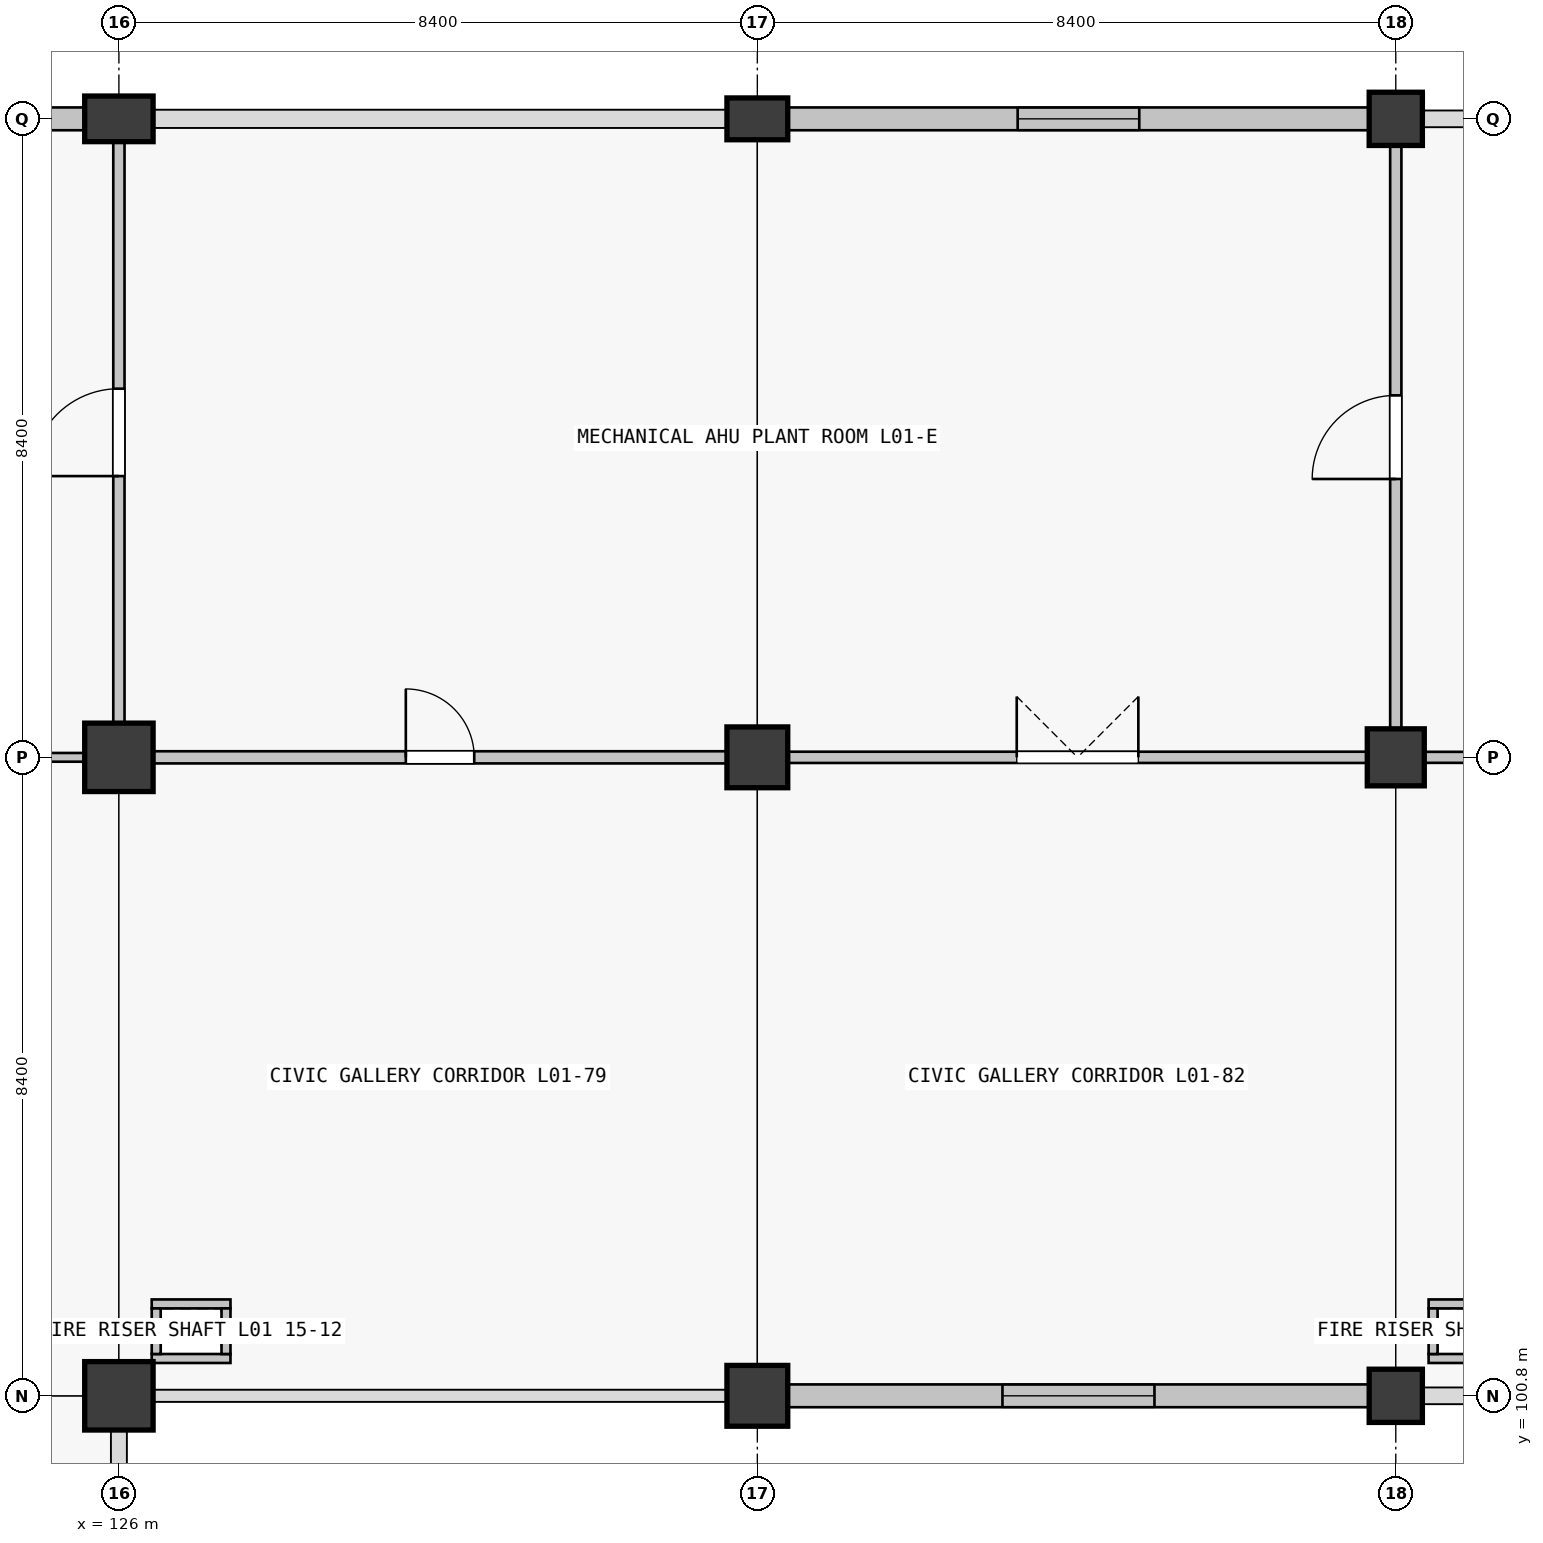
"""IFC4 building model, lengths in metres.
Left out: names, types, materials, properties, quantities, classifications, styles, units other than length and angle.
Written with IfcOpenShell. Run it as: python <this file> out.ifc"""

import sys

from ifc_helpers import new_model, si_unit, direction, frame, frame_2d, origin, origin_2d, place, context, subcontext, project, spatial, rectangle, extrude, element, fill, save


model = new_model("IFC4")
c1 = context("Model", 3, precision=1e-05, world=origin(), true_north=direction((0.0, 1.0)))
c2 = subcontext(c1, "Body", "Model", "MODEL_VIEW")
j1 = project(units=[si_unit("LENGTHUNIT", "METRE"), si_unit("PLANEANGLEUNIT", "RADIAN")], contexts=[c1])
p1 = place(None, origin())
s1 = spatial("IfcSite", under=j1, at=p1, CompositionType="ELEMENT")
p2 = place(p1, origin())
s2 = spatial("IfcBuilding", under=s1, at=p2, CompositionType="ELEMENT")
p3 = place(p2, frame((0.0, 0.0, 5.76)))
s3 = spatial("IfcBuildingStorey", under=s2, at=p3, CompositionType="ELEMENT", Elevation=5.76)
for number, where, z_axis, x_axis in (
    (1, (126.0, 100.8, 0.0), (0.0, 0.0, 1.0), (1.0, 0.0, 0.0)),
    (2, (126.0, 109.2, 0.0), (0.0, 0.0, 1.0), (1.0, 0.0, 0.0)),
):
    element("IfcColumn", number, at=place(p3, frame(where, z_axis=z_axis, x_axis=x_axis)), inside=s3, PredefinedType="COLUMN", context=c2, shape_type="SweptSolid", body=[
        extrude(rectangle(XDim=0.9, YDim=0.9, at=origin_2d()), origin(), (0.0, 0.0, 1.0), 4.5),
    ])
p4 = place(p3, frame((126.0, 117.6, 0.0), z_axis=(0.0, 0.0, 1.0), x_axis=(1.0, 0.0, 0.0)))
e3 = element("IfcColumn", 3, at=p4, inside=s3, PredefinedType="COLUMN", context=c2, shape_type="SweptSolid", body=[
    extrude(rectangle(XDim=0.9, YDim=0.6, at=origin_2d()), origin(), (0.0, 0.0, 1.0), 4.5),
])
for number, where, z_axis, x_axis in (
    (4, (134.4, 100.8, 0.0), (0.0, 0.0, 1.0), (1.0, 0.0, 0.0)),
    (5, (134.4, 109.2, 0.0), (0.0, 0.0, 1.0), (1.0, 0.0, 0.0)),
):
    element("IfcColumn", number, at=place(p3, frame(where, z_axis=z_axis, x_axis=x_axis)), inside=s3, PredefinedType="COLUMN", context=c2, shape_type="SweptSolid", body=[
        extrude(rectangle(XDim=0.8, YDim=0.8, at=origin_2d()), origin(), (0.0, 0.0, 1.0), 4.5),
    ])
p5 = place(p3, frame((134.4, 117.6, 0.0), z_axis=(0.0, 0.0, 1.0), x_axis=(1.0, 0.0, 0.0)))
e6 = element("IfcColumn", 6, at=p5, inside=s3, PredefinedType="COLUMN", context=c2, shape_type="SweptSolid", body=[
    extrude(rectangle(XDim=0.8, YDim=0.55, at=origin_2d()), origin(), (0.0, 0.0, 1.0), 4.5),
])
p6 = place(p3, frame((142.8, 100.8, 0.0), z_axis=(0.0, 0.0, 1.0), x_axis=(1.0, 0.0, 0.0)))
e7 = element("IfcColumn", 7, at=p6, inside=s3, PredefinedType="COLUMN", context=c2, shape_type="SweptSolid", body=[
    extrude(rectangle(XDim=0.7, YDim=0.7, at=origin_2d()), origin(), (0.0, 0.0, 1.0), 4.5),
])
p7 = place(p3, frame((142.8, 109.2, 0.0), z_axis=(0.0, 0.0, 1.0), x_axis=(1.0, 0.0, 0.0)))
e8 = element("IfcColumn", 8, at=p7, inside=s3, PredefinedType="COLUMN", context=c2, shape_type="SweptSolid", body=[
    extrude(rectangle(XDim=0.75, YDim=0.75, at=origin_2d()), origin(), (0.0, 0.0, 1.0), 4.5),
])
p8 = place(p3, frame((142.8, 117.6, 0.0), z_axis=(0.0, 0.0, 1.0), x_axis=(1.0, 0.0, 0.0)))
e9 = element("IfcColumn", 9, at=p8, inside=s3, PredefinedType="COLUMN", context=c2, shape_type="SweptSolid", body=[
    extrude(rectangle(XDim=0.7, YDim=0.7, at=origin_2d()), origin(), (0.0, 0.0, 1.0), 4.5),
])
p9 = place(p3, frame((118.051, 117.6, 0.0), z_axis=(0.0, 0.0, 1.0), x_axis=(1.0, 0.0, 0.0)))
e10 = element("IfcWall", 10, at=p9, inside=s3, PredefinedType="SOLIDWALL", context=c2, shape_type="SweptSolid", body=[
    extrude(rectangle(XDim=7.498, YDim=0.3, at=frame_2d((3.749, 0.0))), origin(), (0.0, 0.0, 1.0), 3.4),
])
p10 = place(p9, frame((2.499, 0.0, 0.9)))
e11 = element("IfcOpeningElement", 11, at=p10, cuts=e10, PredefinedType="OPENING", context=c2, shape_type="SweptSolid", body=[
    extrude(rectangle(XDim=2.5, YDim=1.65, at=frame_2d((1.25, 0.825))), frame((0.0, 0.15, 0.0), z_axis=(0.0, -1.0, 0.0), x_axis=(1.0, 0.0, 0.0)), (0.0, 0.0, 1.0), 0.3),
])
p11 = place(p3, frame((142.449, 100.8, 0.0), z_axis=(0.0, 0.0, 1.0), x_axis=(-1.0, 0.0, 0.0)))
e12 = element("IfcWall", 12, at=p11, inside=s3, PredefinedType="SOLIDWALL", context=c2, shape_type="SweptSolid", body=[
    extrude(rectangle(XDim=7.648, YDim=0.3, at=frame_2d((3.824, 0.0))), origin(), (0.0, 0.0, 1.0), 3.4),
])
p12 = place(p11, frame((2.824, 0.0, 0.9)))
e13 = element("IfcOpeningElement", 13, at=p12, cuts=e12, PredefinedType="OPENING", context=c2, shape_type="SweptSolid", body=[
    extrude(rectangle(XDim=2.0, YDim=2.25, at=frame_2d((1.0, 1.125))), frame((0.0, 0.15, 0.0), z_axis=(0.0, -1.0, 0.0), x_axis=(1.0, 0.0, 0.0)), (0.0, 0.0, 1.0), 0.3),
])
p13 = place(p3, frame((134.801, 117.6, 0.0), z_axis=(0.0, 0.0, 1.0), x_axis=(1.0, 0.0, 0.0)))
e14 = element("IfcWall", 14, at=p13, inside=s3, PredefinedType="SOLIDWALL", context=c2, shape_type="SweptSolid", body=[
    extrude(rectangle(XDim=7.648, YDim=0.3, at=frame_2d((3.824, 0.0))), origin(), (0.0, 0.0, 1.0), 3.4),
])
p14 = place(p13, frame((3.024, 0.0, 0.9)))
e15 = element("IfcOpeningElement", 15, at=p14, cuts=e14, PredefinedType="OPENING", context=c2, shape_type="SweptSolid", body=[
    extrude(rectangle(XDim=1.6, YDim=2.25, at=frame_2d((0.8, 1.125))), frame((0.0, 0.15, 0.0), z_axis=(0.0, -1.0, 0.0), x_axis=(1.0, 0.0, 0.0)), (0.0, 0.0, 1.0), 0.3),
])
for number, where, z_axis, x_axis in (
    (16, (126.432, 101.291, 0.0), (0.0, 0.0, 1.0), (1.0, 0.0, 0.0)),
    (17, (126.432, 102.009, 0.0), (0.0, 0.0, 1.0), (1.0, 0.0, 0.0)),
):
    element("IfcWall", number, at=place(p3, frame(where, z_axis=z_axis, x_axis=x_axis)), inside=s3, PredefinedType="PARTITIONING", context=c2, shape_type="SweptSolid", body=[
        extrude(rectangle(XDim=1.036, YDim=0.118, at=frame_2d((0.518, 0.0))), origin(), (0.0, 0.0, 1.0), 3.48),
    ])
for number, where, z_axis, x_axis in (
    (18, (126.491, 101.35, 0.0), (0.0, 0.0, 1.0), (0.0, 1.0, 0.0)),
    (19, (127.409, 101.35, 0.0), (0.0, 0.0, 1.0), (0.0, 1.0, 0.0)),
):
    element("IfcWall", number, at=place(p3, frame(where, z_axis=z_axis, x_axis=x_axis)), inside=s3, PredefinedType="PARTITIONING", context=c2, shape_type="SweptSolid", body=[
        extrude(rectangle(XDim=0.6, YDim=0.118, at=frame_2d((0.3, 0.0))), origin(), (0.0, 0.0, 1.0), 3.48),
    ])
for number, where, z_axis, x_axis in (
    (20, (143.232, 101.291, 0.0), (0.0, 0.0, 1.0), (1.0, 0.0, 0.0)),
    (21, (143.232, 102.009, 0.0), (0.0, 0.0, 1.0), (1.0, 0.0, 0.0)),
):
    element("IfcWall", number, at=place(p3, frame(where, z_axis=z_axis, x_axis=x_axis)), inside=s3, PredefinedType="PARTITIONING", context=c2, shape_type="SweptSolid", body=[
        extrude(rectangle(XDim=1.036, YDim=0.118, at=frame_2d((0.518, 0.0))), origin(), (0.0, 0.0, 1.0), 3.48),
    ])
p15 = place(p3, frame((143.291, 101.35, 0.0), z_axis=(0.0, 0.0, 1.0), x_axis=(0.0, 1.0, 0.0)))
e22 = element("IfcWall", 22, at=p15, inside=s3, PredefinedType="PARTITIONING", context=c2, shape_type="SweptSolid", body=[
    extrude(rectangle(XDim=0.6, YDim=0.118, at=frame_2d((0.3, 0.0))), origin(), (0.0, 0.0, 1.0), 3.48),
])
p16 = place(p3, frame((118.052, 109.2, 0.0), z_axis=(0.0, 0.0, 1.0), x_axis=(1.0, 0.0, 0.0)))
e23 = element("IfcWall", 23, at=p16, inside=s3, PredefinedType="PARTITIONING", context=c2, shape_type="SweptSolid", body=[
    extrude(rectangle(XDim=7.496, YDim=0.115, at=frame_2d((3.748, 0.0))), origin(), (0.0, 0.0, 1.0), 2.4),
])
p17 = place(p16, frame((3.248, 0.0, 0.0)))
e24 = element("IfcOpeningElement", 24, at=p17, cuts=e23, PredefinedType="OPENING", context=c2, shape_type="SweptSolid", body=[
    extrude(rectangle(XDim=1.0, YDim=2.2, at=frame_2d((0.5, 1.1))), frame((0.0, 0.058, 0.0), z_axis=(0.0, -1.0, 0.0), x_axis=(1.0, 0.0, 0.0)), (0.0, 0.0, 1.0), 0.115),
])
p18 = place(p3, frame((126.452, 109.2, 0.0), z_axis=(0.0, 0.0, 1.0), x_axis=(1.0, 0.0, 0.0)))
e25 = element("IfcWall", 25, at=p18, inside=s3, PredefinedType="PARTITIONING", context=c2, shape_type="SweptSolid", body=[
    extrude(rectangle(XDim=7.546, YDim=0.16, at=frame_2d((3.773, 0.0))), origin(), (0.0, 0.0, 1.0), 2.4),
])
p19 = place(p18, frame((3.323, 0.0, 0.0)))
e26 = element("IfcOpeningElement", 26, at=p19, cuts=e25, PredefinedType="OPENING", context=c2, shape_type="SweptSolid", body=[
    extrude(rectangle(XDim=0.9, YDim=2.05, at=frame_2d((0.45, 1.025))), frame((0.0, 0.08, 0.0), z_axis=(0.0, -1.0, 0.0), x_axis=(1.0, 0.0, 0.0)), (0.0, 0.0, 1.0), 0.16),
])
p20 = place(p3, frame((134.802, 109.2, 0.0), z_axis=(0.0, 0.0, 1.0), x_axis=(1.0, 0.0, 0.0)))
e27 = element("IfcWall", 27, at=p20, inside=s3, PredefinedType="PARTITIONING", context=c2, shape_type="SweptSolid", body=[
    extrude(rectangle(XDim=7.621, YDim=0.148, at=frame_2d((3.811, 0.0))), origin(), (0.0, 0.0, 1.0), 2.4),
])
p21 = place(p20, frame((3.011, 0.0, 0.0)))
e28 = element("IfcOpeningElement", 28, at=p21, cuts=e27, PredefinedType="OPENING", context=c2, shape_type="SweptSolid", body=[
    extrude(rectangle(XDim=1.6, YDim=2.2, at=frame_2d((0.8, 1.1))), frame((0.0, 0.074, 0.0), z_axis=(0.0, -1.0, 0.0), x_axis=(1.0, 0.0, 0.0)), (0.0, 0.0, 1.0), 0.148),
])
p22 = place(p3, frame((143.177, 109.2, 0.0), z_axis=(0.0, 0.0, 1.0), x_axis=(1.0, 0.0, 0.0)))
e29 = element("IfcWall", 29, at=p22, inside=s3, PredefinedType="PARTITIONING", context=c2, shape_type="SweptSolid", body=[
    extrude(rectangle(XDim=7.671, YDim=0.145, at=frame_2d((3.835, 0.0))), origin(), (0.0, 0.0, 1.0), 2.4),
])
p23 = place(p22, frame((3.376, 0.0, 0.0)))
e30 = element("IfcOpeningElement", 30, at=p23, cuts=e29, PredefinedType="OPENING", context=c2, shape_type="SweptSolid", body=[
    extrude(rectangle(XDim=0.92, YDim=2.15, at=frame_2d((0.46, 1.075))), frame((0.0, 0.073, 0.0), z_axis=(0.0, -1.0, 0.0), x_axis=(1.0, 0.0, 0.0)), (0.0, 0.0, 1.0), 0.145),
])
p24 = place(p3, frame((126.0, 109.652, 0.0), z_axis=(0.0, 0.0, 1.0), x_axis=(0.0, 1.0, 0.0)))
e31 = element("IfcWall", 31, at=p24, inside=s3, PredefinedType="PARTITIONING", context=c2, shape_type="SweptSolid", body=[
    extrude(rectangle(XDim=7.646, YDim=0.148, at=frame_2d((3.823, 0.0))), origin(), (0.0, 0.0, 1.0), 2.4),
])
p25 = place(p24, frame((3.248, 0.0, 0.0)))
e32 = element("IfcOpeningElement", 32, at=p25, cuts=e31, PredefinedType="OPENING", context=c2, shape_type="SweptSolid", body=[
    extrude(rectangle(XDim=1.15, YDim=2.2, at=frame_2d((0.575, 1.1))), frame((0.0, 0.074, 0.0), z_axis=(0.0, -1.0, 0.0), x_axis=(1.0, 0.0, 0.0)), (0.0, 0.0, 1.0), 0.148),
])
p26 = place(p3, frame((142.8, 109.577, 0.0), z_axis=(0.0, 0.0, 1.0), x_axis=(0.0, 1.0, 0.0)))
e33 = element("IfcWall", 33, at=p26, inside=s3, PredefinedType="PARTITIONING", context=c2, shape_type="SweptSolid", body=[
    extrude(rectangle(XDim=7.671, YDim=0.148, at=frame_2d((3.835, 0.0))), origin(), (0.0, 0.0, 1.0), 2.4),
])
p27 = place(p26, frame((3.285, 0.0, 0.0)))
e34 = element("IfcOpeningElement", 34, at=p27, cuts=e33, PredefinedType="OPENING", context=c2, shape_type="SweptSolid", body=[
    extrude(rectangle(XDim=1.1, YDim=2.15, at=frame_2d((0.55, 1.075))), frame((0.0, 0.074, 0.0), z_axis=(0.0, -1.0, 0.0), x_axis=(1.0, 0.0, 0.0)), (0.0, 0.0, 1.0), 0.148),
])
p28 = place(p12, origin())
e35 = element("IfcWindow", 35, at=p28, inside=s3, PartitioningType="SINGLE_PANEL", PredefinedType="WINDOW", context=c2, shape_type="SweptSolid", body=[
    extrude(rectangle(XDim=2.0, YDim=2.25, at=frame_2d((1.0, 1.125))), frame((0.0, 0.03, 0.0), z_axis=(0.0, -1.0, 0.0), x_axis=(1.0, 0.0, 0.0)), (0.0, 0.0, 1.0), 0.06),
])
fill(e13, e35)
p29 = place(p14, origin())
e36 = element("IfcWindow", 36, at=p29, inside=s3, PartitioningType="SINGLE_PANEL", PredefinedType="WINDOW", context=c2, shape_type="SweptSolid", body=[
    extrude(rectangle(XDim=1.6, YDim=2.25, at=frame_2d((0.8, 1.125))), frame((0.0, 0.03, 0.0), z_axis=(0.0, -1.0, 0.0), x_axis=(1.0, 0.0, 0.0)), (0.0, 0.0, 1.0), 0.06),
])
fill(e15, e36)
p30 = place(p19, origin())
e37 = element("IfcDoor", 37, at=p30, inside=s3, OperationType="SINGLE_SWING_LEFT", PredefinedType="DOOR", context=c2, shape_type="SweptSolid", body=[
    extrude(rectangle(XDim=0.9, YDim=2.05, at=frame_2d((0.45, 1.025))), frame((0.0, 0.025, 0.0), z_axis=(0.0, -1.0, 0.0), x_axis=(1.0, 0.0, 0.0)), (0.0, 0.0, 1.0), 0.05),
])
fill(e26, e37)
p31 = place(p21, origin())
e38 = element("IfcDoor", 38, at=p31, inside=s3, OperationType="DOUBLE_DOOR_SINGLE_SWING", PredefinedType="DOOR", context=c2, shape_type="SweptSolid", body=[
    extrude(rectangle(XDim=1.6, YDim=2.2, at=frame_2d((0.8, 1.1))), frame((0.0, 0.025, 0.0), z_axis=(0.0, -1.0, 0.0), x_axis=(1.0, 0.0, 0.0)), (0.0, 0.0, 1.0), 0.05),
])
fill(e28, e38)
p32 = place(p25, origin())
e39 = element("IfcDoor", 39, at=p32, inside=s3, OperationType="SINGLE_SWING_LEFT", PredefinedType="DOOR", context=c2, shape_type="SweptSolid", body=[
    extrude(rectangle(XDim=1.15, YDim=2.2, at=frame_2d((0.575, 1.1))), frame((0.0, 0.025, 0.0), z_axis=(0.0, -1.0, 0.0), x_axis=(1.0, 0.0, 0.0)), (0.0, 0.0, 1.0), 0.05),
])
fill(e32, e39)
p33 = place(p27, origin())
e40 = element("IfcDoor", 40, at=p33, inside=s3, OperationType="SINGLE_SWING_LEFT", PredefinedType="DOOR", context=c2, shape_type="SweptSolid", body=[
    extrude(rectangle(XDim=1.1, YDim=2.15, at=frame_2d((0.55, 1.075))), frame((0.0, 0.025, 0.0), z_axis=(0.0, -1.0, 0.0), x_axis=(1.0, 0.0, 0.0)), (0.0, 0.0, 1.0), 0.05),
])
fill(e34, e40)
save(model, sys.argv[1])
